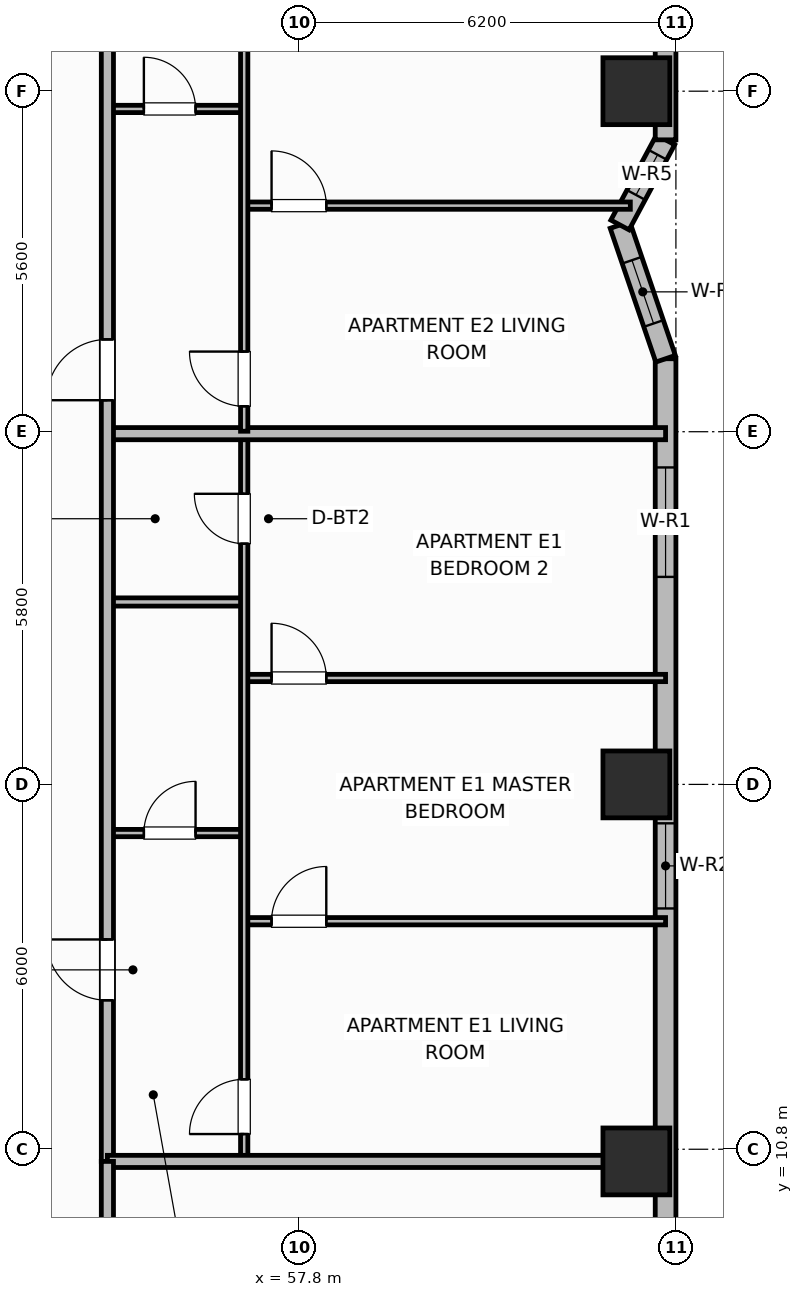
"""IFC4 building model, lengths in metres.
Left out: names, types, materials, properties, quantities, classifications, styles, units other than length and angle.
Written with IfcOpenShell. Run it as: python <this file> out.ifc"""

import sys

from ifc_helpers import new_model, si_unit, direction, frame, frame_2d, origin, origin_2d, place, context, subcontext, project, spatial, rectangle, extrude, element, fill, save


model = new_model("IFC4")
c1 = context("Model", 3, precision=1e-05, world=origin(), true_north=direction((0.0, 1.0)))
c2 = subcontext(c1, "Body", "Model", "MODEL_VIEW")
j1 = project(units=[si_unit("LENGTHUNIT", "METRE"), si_unit("PLANEANGLEUNIT", "RADIAN")], contexts=[c1])
p1 = place(None, origin())
s1 = spatial("IfcSite", under=j1, at=p1, CompositionType="ELEMENT")
p2 = place(p1, origin())
s2 = spatial("IfcBuilding", under=s1, at=p2, CompositionType="ELEMENT")
p3 = place(p2, frame((0.0, 0.0, 117.9)))
s3 = spatial("IfcBuildingStorey", under=s2, at=p3, CompositionType="ELEMENT", Elevation=117.9)
for number, where, z_axis, x_axis in (
    (1, (63.35, 10.6, 0.0), (0.0, 0.0, 1.0), (1.0, 0.0, 0.0)),
    (2, (63.35, 16.8, 0.0), (0.0, 0.0, 1.0), (1.0, 0.0, 0.0)),
    (3, (63.35, 28.2, 0.0), (0.0, 0.0, 1.0), (1.0, 0.0, 0.0)),
):
    element("IfcColumn", number, at=place(p3, frame(where, z_axis=z_axis, x_axis=x_axis)), inside=s3, PredefinedType="COLUMN", context=c2, shape_type="SweptSolid", body=[
        extrude(rectangle(XDim=1.1, YDim=1.1, at=origin_2d()), origin(), (0.0, 0.0, 1.0), 3.7),
    ])
p4 = place(p3, frame((63.83, 9.0, 0.0), z_axis=(0.0, 0.0, 1.0), x_axis=(0.0, 1.0, 0.0)))
e4 = element("IfcWall", 4, at=p4, inside=s3, PredefinedType="SOLIDWALL", context=c2, shape_type="SweptSolid", body=[
    extrude(rectangle(XDim=14.8, YDim=0.34, at=frame_2d((7.4, 0.0))), origin(), (0.0, 0.0, 1.0), 2.7),
])
p5 = place(p4, frame((5.76, 0.0, 0.69)))
e5 = element("IfcOpeningElement", 5, at=p5, cuts=e4, PredefinedType="OPENING", context=c2, shape_type="SweptSolid", body=[
    extrude(rectangle(XDim=1.4, YDim=1.85, at=frame_2d((0.7, 0.925))), frame((0.0, 0.18, 0.0), z_axis=(0.0, -1.0, 0.0), x_axis=(1.0, 0.0, 0.0)), (0.0, 0.0, 1.0), 0.36),
])
p6 = place(p4, frame((11.212, 0.0, 0.73)))
e6 = element("IfcOpeningElement", 6, at=p6, cuts=e4, PredefinedType="OPENING", context=c2, shape_type="SweptSolid", body=[
    extrude(rectangle(XDim=1.8, YDim=1.85, at=frame_2d((0.9, 0.925))), frame((0.0, 0.18, 0.0), z_axis=(0.0, -1.0, 0.0), x_axis=(1.0, 0.0, 0.0)), (0.0, 0.0, 1.0), 0.36),
])
p7 = place(p3, frame((63.83, 23.8, 0.0), z_axis=(0.0, 0.0, 1.0), x_axis=(-0.322680343871, 0.946508000853, 0.0)))
e7 = element("IfcWall", 7, at=p7, inside=s3, PredefinedType="SOLIDWALL", context=c2, shape_type="SweptSolid", body=[
    extrude(rectangle(XDim=2.324, YDim=0.34, at=frame_2d((1.162, 0.0))), origin(), (0.0, 0.0, 1.0), 2.7),
])
p8 = place(p7, frame((0.612, 0.0, 0.89)))
e8 = element("IfcOpeningElement", 8, at=p8, cuts=e7, PredefinedType="OPENING", context=c2, shape_type="SweptSolid", body=[
    extrude(rectangle(XDim=1.1, YDim=1.65, at=frame_2d((0.55, 0.825))), frame((0.0, 0.18, 0.0), z_axis=(0.0, -1.0, 0.0), x_axis=(1.0, 0.0, 0.0)), (0.0, 0.0, 1.0), 0.36),
])
p9 = place(p3, frame((63.08, 26.0, 0.0), z_axis=(0.0, 0.0, 1.0), x_axis=(0.472247007964, 0.881466257703, 0.0)))
e9 = element("IfcWall", 9, at=p9, inside=s3, PredefinedType="SOLIDWALL", context=c2, shape_type="SweptSolid", body=[
    extrude(rectangle(XDim=1.588, YDim=0.34, at=frame_2d((0.794, 0.0))), origin(), (0.0, 0.0, 1.0), 2.7),
])
p10 = place(p9, frame((0.56, 0.0, 0.89)))
e10 = element("IfcOpeningElement", 10, at=p10, cuts=e9, PredefinedType="OPENING", context=c2, shape_type="SweptSolid", body=[
    extrude(rectangle(XDim=0.75, YDim=1.65, at=frame_2d((0.375, 0.825))), frame((0.0, 0.18, 0.0), z_axis=(0.0, -1.0, 0.0), x_axis=(1.0, 0.0, 0.0)), (0.0, 0.0, 1.0), 0.36),
])
p11 = place(p3, frame((63.83, 27.4, 0.0), z_axis=(0.0, 0.0, 1.0), x_axis=(0.0, 1.0, 0.0)))
e11 = element("IfcWall", 11, at=p11, inside=s3, PredefinedType="SOLIDWALL", context=c2, shape_type="SweptSolid", body=[
    extrude(rectangle(XDim=1.6, YDim=0.34, at=frame_2d((0.8, 0.0))), origin(), (0.0, 0.0, 1.0), 2.7),
])
p12 = place(p3, frame((54.65, 16.0, 0.0), z_axis=(0.0, 0.0, 1.0), x_axis=(1.0, 0.0, 0.0)))
e12 = element("IfcWall", 12, at=p12, inside=s3, PredefinedType="PARTITIONING", context=c2, shape_type="SweptSolid", body=[
    extrude(rectangle(XDim=2.25, YDim=0.12, at=frame_2d((1.125, 0.0))), origin(), (0.0, 0.0, 1.0), 2.53),
])
p13 = place(p12, frame((0.6, 0.0, 0.0)))
e13 = element("IfcOpeningElement", 13, at=p13, cuts=e12, PredefinedType="OPENING", context=c2, shape_type="SweptSolid", body=[
    extrude(rectangle(XDim=0.85, YDim=2.1, at=frame_2d((0.425, 1.05))), frame((0.0, 0.07, 0.0), z_axis=(0.0, -1.0, 0.0), x_axis=(1.0, 0.0, 0.0)), (0.0, 0.0, 1.0), 0.14),
])
p14 = place(p3, frame((54.65, 19.8, 0.0), z_axis=(0.0, 0.0, 1.0), x_axis=(1.0, 0.0, 0.0)))
e14 = element("IfcWall", 14, at=p14, inside=s3, PredefinedType="PARTITIONING", context=c2, shape_type="SweptSolid", body=[
    extrude(rectangle(XDim=2.25, YDim=0.135, at=frame_2d((1.125, 0.0))), origin(), (0.0, 0.0, 1.0), 2.53),
])
p15 = place(p3, frame((56.9, 14.55, 0.0), z_axis=(0.0, 0.0, 1.0), x_axis=(1.0, 0.0, 0.0)))
e15 = element("IfcWall", 15, at=p15, inside=s3, PredefinedType="PARTITIONING", context=c2, shape_type="SweptSolid", body=[
    extrude(rectangle(XDim=6.93, YDim=0.12, at=frame_2d((3.465, 0.0))), origin(), (0.0, 0.0, 1.0), 2.53),
])
p16 = place(p15, frame((0.45, 0.0, 0.0)))
e16 = element("IfcOpeningElement", 16, at=p16, cuts=e15, PredefinedType="OPENING", context=c2, shape_type="SweptSolid", body=[
    extrude(rectangle(XDim=0.9, YDim=2.1, at=frame_2d((0.45, 1.05))), frame((0.0, 0.07, 0.0), z_axis=(0.0, -1.0, 0.0), x_axis=(1.0, 0.0, 0.0)), (0.0, 0.0, 1.0), 0.14),
])
p17 = place(p3, frame((56.9, 18.55, 0.0), z_axis=(0.0, 0.0, 1.0), x_axis=(1.0, 0.0, 0.0)))
e17 = element("IfcWall", 17, at=p17, inside=s3, PredefinedType="PARTITIONING", context=c2, shape_type="SweptSolid", body=[
    extrude(rectangle(XDim=6.93, YDim=0.12, at=frame_2d((3.465, 0.0))), origin(), (0.0, 0.0, 1.0), 2.53),
])
p18 = place(p17, frame((0.45, 0.0, 0.0)))
e18 = element("IfcOpeningElement", 18, at=p18, cuts=e17, PredefinedType="OPENING", context=c2, shape_type="SweptSolid", body=[
    extrude(rectangle(XDim=0.9, YDim=2.1, at=frame_2d((0.45, 1.05))), frame((0.0, 0.07, 0.0), z_axis=(0.0, -1.0, 0.0), x_axis=(1.0, 0.0, 0.0)), (0.0, 0.0, 1.0), 0.14),
])
p19 = place(p3, frame((56.9, 10.64, 0.0), z_axis=(0.0, 0.0, 1.0), x_axis=(0.0, 1.0, 0.0)))
e19 = element("IfcWall", 19, at=p19, inside=s3, PredefinedType="PARTITIONING", context=c2, shape_type="SweptSolid", body=[
    extrude(rectangle(XDim=11.888, YDim=0.12, at=frame_2d((5.944, 0.0))), origin(), (0.0, 0.0, 1.0), 2.53),
])
p20 = place(p19, frame((0.41, 0.0, 0.0)))
e20 = element("IfcOpeningElement", 20, at=p20, cuts=e19, PredefinedType="OPENING", context=c2, shape_type="SweptSolid", body=[
    extrude(rectangle(XDim=0.9, YDim=2.1, at=frame_2d((0.45, 1.05))), frame((0.0, 0.07, 0.0), z_axis=(0.0, -1.0, 0.0), x_axis=(1.0, 0.0, 0.0)), (0.0, 0.0, 1.0), 0.14),
])
p21 = place(p19, frame((10.119, 0.0, 0.0)))
e21 = element("IfcOpeningElement", 21, at=p21, cuts=e19, PredefinedType="OPENING", context=c2, shape_type="SweptSolid", body=[
    extrude(rectangle(XDim=0.82, YDim=2.08, at=frame_2d((0.41, 1.04))), frame((0.0, 0.07, 0.0), z_axis=(0.0, -1.0, 0.0), x_axis=(1.0, 0.0, 0.0)), (0.0, 0.0, 1.0), 0.14),
])
p22 = place(p3, frame((54.65, 22.568, 0.0), z_axis=(0.0, 0.0, 1.0), x_axis=(1.0, 0.0, 0.0)))
e22 = element("IfcWall", 22, at=p22, inside=s3, PredefinedType="PARTITIONING", context=c2, shape_type="SweptSolid", body=[
    extrude(rectangle(XDim=9.18, YDim=0.2, at=frame_2d((4.59, 0.0))), origin(), (0.0, 0.0, 1.0), 2.53),
])
p23 = place(p3, frame((54.65, 27.908, 0.0), z_axis=(0.0, 0.0, 1.0), x_axis=(1.0, 0.0, 0.0)))
e23 = element("IfcWall", 23, at=p23, inside=s3, PredefinedType="PARTITIONING", context=c2, shape_type="SweptSolid", body=[
    extrude(rectangle(XDim=2.25, YDim=0.12, at=frame_2d((1.125, 0.0))), origin(), (0.0, 0.0, 1.0), 2.53),
])
p24 = place(p23, frame((0.6, 0.0, 0.0)))
e24 = element("IfcOpeningElement", 24, at=p24, cuts=e23, PredefinedType="OPENING", context=c2, shape_type="SweptSolid", body=[
    extrude(rectangle(XDim=0.85, YDim=2.1, at=frame_2d((0.425, 1.05))), frame((0.0, 0.07, 0.0), z_axis=(0.0, -1.0, 0.0), x_axis=(1.0, 0.0, 0.0)), (0.0, 0.0, 1.0), 0.14),
])
p25 = place(p3, frame((56.9, 26.318, 0.0), z_axis=(0.0, 0.0, 1.0), x_axis=(1.0, 0.0, 0.0)))
e25 = element("IfcWall", 25, at=p25, inside=s3, PredefinedType="PARTITIONING", context=c2, shape_type="SweptSolid", body=[
    extrude(rectangle(XDim=6.351, YDim=0.12, at=frame_2d((3.175, 0.0))), origin(), (0.0, 0.0, 1.0), 2.53),
])
p26 = place(p25, frame((0.45, 0.0, 0.0)))
e26 = element("IfcOpeningElement", 26, at=p26, cuts=e25, PredefinedType="OPENING", context=c2, shape_type="SweptSolid", body=[
    extrude(rectangle(XDim=0.9, YDim=2.1, at=frame_2d((0.45, 1.05))), frame((0.0, 0.07, 0.0), z_axis=(0.0, -1.0, 0.0), x_axis=(1.0, 0.0, 0.0)), (0.0, 0.0, 1.0), 0.14),
])
p27 = place(p3, frame((56.9, 22.608, 0.0), z_axis=(0.0, 0.0, 1.0), x_axis=(0.0, 1.0, 0.0)))
e27 = element("IfcWall", 27, at=p27, inside=s3, PredefinedType="PARTITIONING", context=c2, shape_type="SweptSolid", body=[
    extrude(rectangle(XDim=11.052, YDim=0.12, at=frame_2d((5.526, 0.0))), origin(), (0.0, 0.0, 1.0), 2.53),
])
p28 = place(p27, frame((0.41, 0.0, 0.0)))
e28 = element("IfcOpeningElement", 28, at=p28, cuts=e27, PredefinedType="OPENING", context=c2, shape_type="SweptSolid", body=[
    extrude(rectangle(XDim=0.9, YDim=2.1, at=frame_2d((0.45, 1.05))), frame((0.0, 0.07, 0.0), z_axis=(0.0, -1.0, 0.0), x_axis=(1.0, 0.0, 0.0)), (0.0, 0.0, 1.0), 0.14),
])
p29 = place(p3, frame((54.65, 10.6, 0.0), z_axis=(0.0, 0.0, 1.0), x_axis=(0.0, 1.0, 0.0)))
e29 = element("IfcWall", 29, at=p29, inside=s3, PredefinedType="PARTITIONING", context=c2, shape_type="SweptSolid", body=[
    extrude(rectangle(XDim=35.2, YDim=0.2, at=frame_2d((17.6, 0.0))), origin(), (0.0, 0.0, 1.0), 2.53),
])
p30 = place(p29, frame((2.65, 0.0, 0.0)))
e30 = element("IfcOpeningElement", 30, at=p30, cuts=e29, PredefinedType="OPENING", context=c2, shape_type="SweptSolid", body=[
    extrude(rectangle(XDim=1.0, YDim=2.15, at=frame_2d((0.5, 1.075))), frame((0.0, 0.11, 0.0), z_axis=(0.0, -1.0, 0.0), x_axis=(1.0, 0.0, 0.0)), (0.0, 0.0, 1.0), 0.22),
])
p31 = place(p29, frame((12.518, 0.0, 0.0)))
e31 = element("IfcOpeningElement", 31, at=p31, cuts=e29, PredefinedType="OPENING", context=c2, shape_type="SweptSolid", body=[
    extrude(rectangle(XDim=1.0, YDim=2.15, at=frame_2d((0.5, 1.075))), frame((0.0, 0.11, 0.0), z_axis=(0.0, -1.0, 0.0), x_axis=(1.0, 0.0, 0.0)), (0.0, 0.0, 1.0), 0.22),
])
p32 = place(p29, frame((23.65, 0.0, 0.0)))
e32 = element("IfcOpeningElement", 32, at=p32, cuts=e29, PredefinedType="OPENING", context=c2, shape_type="SweptSolid", body=[
    extrude(rectangle(XDim=1.0, YDim=2.15, at=frame_2d((0.5, 1.075))), frame((0.0, 0.11, 0.0), z_axis=(0.0, -1.0, 0.0), x_axis=(1.0, 0.0, 0.0)), (0.0, 0.0, 1.0), 0.22),
])
p33 = place(p3, frame((54.65, 10.6, 0.0), z_axis=(0.0, 0.0, 1.0), x_axis=(1.0, 0.0, 0.0)))
e33 = element("IfcWall", 33, at=p33, inside=s3, PredefinedType="PARTITIONING", context=c2, shape_type="SweptSolid", body=[
    extrude(rectangle(XDim=8.76, YDim=0.2, at=frame_2d((4.38, 0.0))), origin(), (0.0, 0.0, 1.0), 2.53),
])
p34 = place(p3, frame((54.65, 4.97, 0.0), z_axis=(0.0, 0.0, 1.0), x_axis=(0.0, 1.0, 0.0)))
e34 = element("IfcWall", 34, at=p34, inside=s3, PredefinedType="PARTITIONING", context=c2, shape_type="SweptSolid", body=[
    extrude(rectangle(XDim=5.63, YDim=0.2, at=frame_2d((2.815, 0.0))), origin(), (0.0, 0.0, 1.0), 2.53),
])
p35 = place(p5, origin())
e35 = element("IfcWindow", 35, at=p35, inside=s3, PartitioningType="SINGLE_PANEL", PredefinedType="WINDOW", context=c2, shape_type="SweptSolid", body=[
    extrude(rectangle(XDim=1.4, YDim=1.85, at=frame_2d((0.7, 0.925))), frame((0.0, 0.03, 0.0), z_axis=(0.0, -1.0, 0.0), x_axis=(1.0, 0.0, 0.0)), (0.0, 0.0, 1.0), 0.06),
])
fill(e5, e35)
p36 = place(p6, origin())
e36 = element("IfcWindow", 36, at=p36, inside=s3, PartitioningType="SINGLE_PANEL", PredefinedType="WINDOW", context=c2, shape_type="SweptSolid", body=[
    extrude(rectangle(XDim=1.8, YDim=1.85, at=frame_2d((0.9, 0.925))), frame((0.0, 0.03, 0.0), z_axis=(0.0, -1.0, 0.0), x_axis=(1.0, 0.0, 0.0)), (0.0, 0.0, 1.0), 0.06),
])
fill(e6, e36)
p37 = place(p8, origin())
e37 = element("IfcWindow", 37, at=p37, inside=s3, PartitioningType="SINGLE_PANEL", PredefinedType="WINDOW", context=c2, shape_type="SweptSolid", body=[
    extrude(rectangle(XDim=1.1, YDim=1.65, at=frame_2d((0.55, 0.825))), frame((0.0, 0.03, 0.0), z_axis=(0.0, -1.0, 0.0), x_axis=(1.0, 0.0, 0.0)), (0.0, 0.0, 1.0), 0.06),
])
fill(e8, e37)
p38 = place(p10, origin())
e38 = element("IfcWindow", 38, at=p38, inside=s3, PartitioningType="SINGLE_PANEL", PredefinedType="WINDOW", context=c2, shape_type="SweptSolid", body=[
    extrude(rectangle(XDim=0.75, YDim=1.65, at=frame_2d((0.375, 0.825))), frame((0.0, 0.03, 0.0), z_axis=(0.0, -1.0, 0.0), x_axis=(1.0, 0.0, 0.0)), (0.0, 0.0, 1.0), 0.06),
])
fill(e10, e38)
p39 = place(p13, origin())
e39 = element("IfcDoor", 39, at=p39, inside=s3, OperationType="SINGLE_SWING_RIGHT", PredefinedType="DOOR", context=c2, shape_type="SweptSolid", body=[
    extrude(rectangle(XDim=0.85, YDim=2.1, at=frame_2d((0.425, 1.05))), frame((0.0, 0.025, 0.0), z_axis=(0.0, -1.0, 0.0), x_axis=(1.0, 0.0, 0.0)), (0.0, 0.0, 1.0), 0.05),
])
fill(e13, e39)
p40 = place(p16, origin())
e40 = element("IfcDoor", 40, at=p40, inside=s3, OperationType="SINGLE_SWING_RIGHT", PredefinedType="DOOR", context=c2, shape_type="SweptSolid", body=[
    extrude(rectangle(XDim=0.9, YDim=2.1, at=frame_2d((0.45, 1.05))), frame((0.0, 0.025, 0.0), z_axis=(0.0, -1.0, 0.0), x_axis=(1.0, 0.0, 0.0)), (0.0, 0.0, 1.0), 0.05),
])
fill(e16, e40)
p41 = place(p18, origin())
e41 = element("IfcDoor", 41, at=p41, inside=s3, OperationType="SINGLE_SWING_LEFT", PredefinedType="DOOR", context=c2, shape_type="SweptSolid", body=[
    extrude(rectangle(XDim=0.9, YDim=2.1, at=frame_2d((0.45, 1.05))), frame((0.0, 0.025, 0.0), z_axis=(0.0, -1.0, 0.0), x_axis=(1.0, 0.0, 0.0)), (0.0, 0.0, 1.0), 0.05),
])
fill(e18, e41)
p42 = place(p20, origin())
e42 = element("IfcDoor", 42, at=p42, inside=s3, OperationType="SINGLE_SWING_LEFT", PredefinedType="DOOR", context=c2, shape_type="SweptSolid", body=[
    extrude(rectangle(XDim=0.9, YDim=2.1, at=frame_2d((0.45, 1.05))), frame((0.0, 0.025, 0.0), z_axis=(0.0, -1.0, 0.0), x_axis=(1.0, 0.0, 0.0)), (0.0, 0.0, 1.0), 0.05),
])
fill(e20, e42)
p43 = place(p21, origin())
e43 = element("IfcDoor", 43, at=p43, inside=s3, OperationType="SINGLE_SWING_RIGHT", PredefinedType="DOOR", context=c2, shape_type="SweptSolid", body=[
    extrude(rectangle(XDim=0.82, YDim=2.08, at=frame_2d((0.41, 1.04))), frame((0.0, 0.025, 0.0), z_axis=(0.0, -1.0, 0.0), x_axis=(1.0, 0.0, 0.0)), (0.0, 0.0, 1.0), 0.05),
])
fill(e21, e43)
p44 = place(p24, origin())
e44 = element("IfcDoor", 44, at=p44, inside=s3, OperationType="SINGLE_SWING_LEFT", PredefinedType="DOOR", context=c2, shape_type="SweptSolid", body=[
    extrude(rectangle(XDim=0.85, YDim=2.1, at=frame_2d((0.425, 1.05))), frame((0.0, 0.025, 0.0), z_axis=(0.0, -1.0, 0.0), x_axis=(1.0, 0.0, 0.0)), (0.0, 0.0, 1.0), 0.05),
])
fill(e24, e44)
p45 = place(p26, origin())
e45 = element("IfcDoor", 45, at=p45, inside=s3, OperationType="SINGLE_SWING_LEFT", PredefinedType="DOOR", context=c2, shape_type="SweptSolid", body=[
    extrude(rectangle(XDim=0.9, YDim=2.1, at=frame_2d((0.45, 1.05))), frame((0.0, 0.025, 0.0), z_axis=(0.0, -1.0, 0.0), x_axis=(1.0, 0.0, 0.0)), (0.0, 0.0, 1.0), 0.05),
])
fill(e26, e45)
p46 = place(p28, origin())
e46 = element("IfcDoor", 46, at=p46, inside=s3, OperationType="SINGLE_SWING_RIGHT", PredefinedType="DOOR", context=c2, shape_type="SweptSolid", body=[
    extrude(rectangle(XDim=0.9, YDim=2.1, at=frame_2d((0.45, 1.05))), frame((0.0, 0.025, 0.0), z_axis=(0.0, -1.0, 0.0), x_axis=(1.0, 0.0, 0.0)), (0.0, 0.0, 1.0), 0.05),
])
fill(e28, e46)
p47 = place(p30, origin())
e47 = element("IfcDoor", 47, at=p47, inside=s3, OperationType="SINGLE_SWING_RIGHT", PredefinedType="DOOR", context=c2, shape_type="SweptSolid", body=[
    extrude(rectangle(XDim=1.0, YDim=2.15, at=frame_2d((0.5, 1.075))), frame((0.0, 0.025, 0.0), z_axis=(0.0, -1.0, 0.0), x_axis=(1.0, 0.0, 0.0)), (0.0, 0.0, 1.0), 0.05),
])
fill(e30, e47)
p48 = place(p31, origin())
e48 = element("IfcDoor", 48, at=p48, inside=s3, OperationType="SINGLE_SWING_LEFT", PredefinedType="DOOR", context=c2, shape_type="SweptSolid", body=[
    extrude(rectangle(XDim=1.0, YDim=2.15, at=frame_2d((0.5, 1.075))), frame((0.0, 0.025, 0.0), z_axis=(0.0, -1.0, 0.0), x_axis=(1.0, 0.0, 0.0)), (0.0, 0.0, 1.0), 0.05),
])
fill(e31, e48)
save(model, sys.argv[1])
